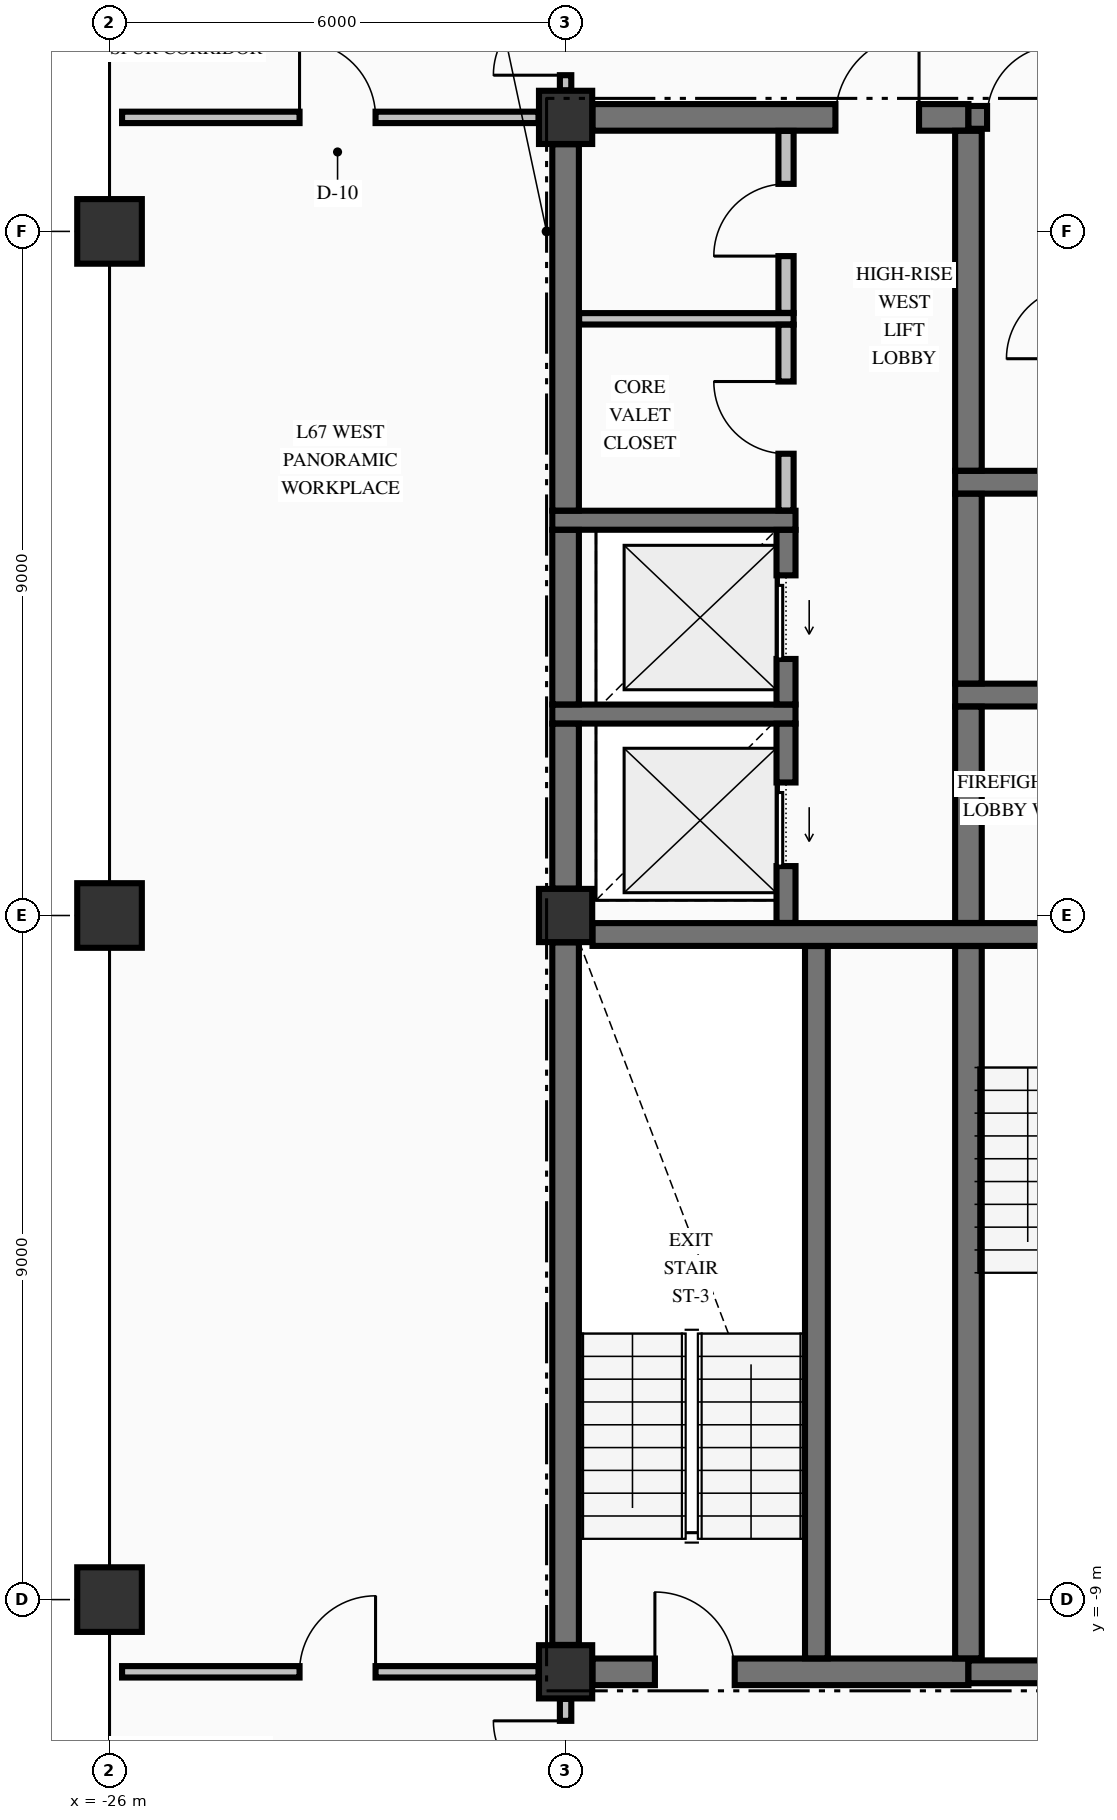
"""IFC4 building model, lengths in metres.
Left out: names, types, materials, properties, quantities, classifications, styles, units other than length and angle.
Written with IfcOpenShell. Run it as: python <this file> out.ifc"""

import sys

from ifc_helpers import new_model, si_unit, direction, frame, frame_2d, origin, origin_2d, place, context, subcontext, project, spatial, rectangle, extrude, element, fill, save


model = new_model("IFC4")
c1 = context("Model", 3, precision=1e-05, world=origin(), true_north=direction((0.0, 1.0)))
c2 = subcontext(c1, "Body", "Model", "MODEL_VIEW")
j1 = project(units=[si_unit("LENGTHUNIT", "METRE"), si_unit("PLANEANGLEUNIT", "RADIAN")], contexts=[c1])
p1 = place(None, origin())
s1 = spatial("IfcSite", under=j1, at=p1, CompositionType="ELEMENT")
p2 = place(p1, origin())
s2 = spatial("IfcBuilding", under=s1, at=p2, CompositionType="ELEMENT")
p3 = place(p2, frame((0.0, 0.0, 254.43)))
s3 = spatial("IfcBuildingStorey", under=s2, at=p3, CompositionType="ELEMENT", Elevation=254.43)
for number, where, z_axis, x_axis in (
    (1, (-26.0, -9.0, -0.425), (0.0, 0.0, 1.0), (1.0, 0.0, 0.0)),
    (2, (-26.0, 0.0, -0.425), (0.0, 0.0, 1.0), (1.0, 0.0, 0.0)),
    (3, (-26.0, 9.0, -0.425), (0.0, 0.0, 1.0), (1.0, 0.0, 0.0)),
):
    element("IfcColumn", number, at=place(p3, frame(where, z_axis=z_axis, x_axis=x_axis)), inside=s3, PredefinedType="COLUMN", context=c2, shape_type="SweptSolid", body=[
        extrude(rectangle(XDim=0.85, YDim=0.85, at=origin_2d()), origin(), (0.0, 0.0, 1.0), 3.405),
    ])
for number, where, z_axis, x_axis in (
    (4, (-20.0, -9.95, -0.425), (0.0, 0.0, 1.0), (1.0, 0.0, 0.0)),
    (5, (-20.0, 10.5, -0.425), (0.0, 0.0, 1.0), (1.0, 0.0, 0.0)),
    (6, (-20.0, 0.0, -0.425), (0.0, 0.0, 1.0), (1.0, 0.0, 0.0)),
):
    element("IfcColumn", number, at=place(p3, frame(where, z_axis=z_axis, x_axis=x_axis)), inside=s3, PredefinedType="COLUMN", context=c2, shape_type="SweptSolid", body=[
        extrude(rectangle(XDim=0.7, YDim=0.7, at=origin_2d()), origin(), (0.0, 0.0, 1.0), 3.405),
    ])
p4 = place(p3, frame((-19.646, -9.95, 0.0), z_axis=(0.0, 0.0, 1.0), x_axis=(1.0, 0.0, 0.0)))
e7 = element("IfcWall", 7, at=p4, inside=s3, PredefinedType="SHEAR", context=c2, shape_type="SweptSolid", body=[
    extrude(rectangle(XDim=4.946, YDim=0.35, at=frame_2d((2.473, 0.0))), origin(), (0.0, 0.0, 1.0), 2.98),
])
p5 = place(p4, frame((0.821, 0.0, 0.0)))
e8 = element("IfcOpeningElement", 8, at=p5, cuts=e7, PredefinedType="OPENING", context=c2, shape_type="SweptSolid", body=[
    extrude(rectangle(XDim=1.05, YDim=2.15, at=frame_2d((0.525, 1.075))), frame((0.0, 0.185, 0.0), z_axis=(0.0, -1.0, 0.0), x_axis=(1.0, 0.0, 0.0)), (0.0, 0.0, 1.0), 0.37),
])
p6 = place(p3, frame((-14.7, -9.95, 0.0), z_axis=(0.0, 0.0, 1.0), x_axis=(1.0, 0.0, 0.0)))
e9 = element("IfcWall", 9, at=p6, inside=s3, PredefinedType="SHEAR", context=c2, shape_type="SweptSolid", body=[
    extrude(rectangle(XDim=3.346, YDim=0.3, at=frame_2d((1.673, 0.0))), origin(), (0.0, 0.0, 1.0), 2.98),
])
p7 = place(p3, frame((-19.646, -0.25, 0.0), z_axis=(0.0, 0.0, 1.0), x_axis=(1.0, 0.0, 0.0)))
e10 = element("IfcWall", 10, at=p7, inside=s3, PredefinedType="SHEAR", context=c2, shape_type="SweptSolid", body=[
    extrude(rectangle(XDim=8.292, YDim=0.3, at=frame_2d((4.146, 0.0))), origin(), (0.0, 0.0, 1.0), 2.98),
])
p8 = place(p7, frame((5.946, 0.0, 0.0)))
e11 = element("IfcOpeningElement", 11, at=p8, cuts=e10, PredefinedType="OPENING", context=c2, shape_type="SweptSolid", body=[
    extrude(rectangle(XDim=1.1, YDim=2.15, at=frame_2d((0.55, 1.075))), frame((0.0, 0.16, 0.0), z_axis=(0.0, -1.0, 0.0), x_axis=(1.0, 0.0, 0.0)), (0.0, 0.0, 1.0), 0.32),
])
p9 = place(p3, frame((-20.175, 2.65, 0.0), z_axis=(0.0, 0.0, 1.0), x_axis=(1.0, 0.0, 0.0)))
e12 = element("IfcWall", 12, at=p9, inside=s3, PredefinedType="SOLIDWALL", context=c2, shape_type="SweptSolid", body=[
    extrude(rectangle(XDim=3.2, YDim=0.25, at=frame_2d((1.6, 0.0))), origin(), (0.0, 0.0, 1.0), 2.98),
])
p10 = place(p3, frame((-14.875, 2.9, 0.0), z_axis=(0.0, 0.0, 1.0), x_axis=(1.0, 0.0, 0.0)))
e13 = element("IfcWall", 13, at=p10, inside=s3, PredefinedType="SHEAR", context=c2, shape_type="SweptSolid", body=[
    extrude(rectangle(XDim=4.025, YDim=0.3, at=frame_2d((2.012, 0.0))), origin(), (0.0, 0.0, 1.0), 2.98),
])
p11 = place(p10, frame((2.075, 0.0, 0.0)))
e14 = element("IfcOpeningElement", 14, at=p11, cuts=e13, PredefinedType="OPENING", context=c2, shape_type="SweptSolid", body=[
    extrude(rectangle(XDim=1.1, YDim=2.2, at=frame_2d((0.55, 1.1))), frame((0.0, 0.16, 0.0), z_axis=(0.0, -1.0, 0.0), x_axis=(1.0, 0.0, 0.0)), (0.0, 0.0, 1.0), 0.32),
])
p12 = place(p3, frame((-20.175, 5.2, 0.0), z_axis=(0.0, 0.0, 1.0), x_axis=(1.0, 0.0, 0.0)))
e15 = element("IfcWall", 15, at=p12, inside=s3, PredefinedType="SOLIDWALL", context=c2, shape_type="SweptSolid", body=[
    extrude(rectangle(XDim=3.2, YDim=0.25, at=frame_2d((1.6, 0.0))), origin(), (0.0, 0.0, 1.0), 2.98),
])
p13 = place(p3, frame((-14.875, 5.7, 0.0), z_axis=(0.0, 0.0, 1.0), x_axis=(1.0, 0.0, 0.0)))
e16 = element("IfcWall", 16, at=p13, inside=s3, PredefinedType="SHEAR", context=c2, shape_type="SweptSolid", body=[
    extrude(rectangle(XDim=4.025, YDim=0.3, at=frame_2d((2.012, 0.0))), origin(), (0.0, 0.0, 1.0), 2.98),
])
p14 = place(p3, frame((-19.646, 10.5, 0.0), z_axis=(0.0, 0.0, 1.0), x_axis=(1.0, 0.0, 0.0)))
e17 = element("IfcWall", 17, at=p14, inside=s3, PredefinedType="SHEAR", context=c2, shape_type="SweptSolid", body=[
    extrude(rectangle(XDim=4.946, YDim=0.35, at=frame_2d((2.473, 0.0))), origin(), (0.0, 0.0, 1.0), 2.98),
])
p15 = place(p14, frame((3.196, 0.0, 0.0)))
e18 = element("IfcOpeningElement", 18, at=p15, cuts=e17, PredefinedType="OPENING", context=c2, shape_type="SweptSolid", body=[
    extrude(rectangle(XDim=1.1, YDim=2.15, at=frame_2d((0.55, 1.075))), frame((0.0, 0.185, 0.0), z_axis=(0.0, -1.0, 0.0), x_axis=(1.0, 0.0, 0.0)), (0.0, 0.0, 1.0), 0.37),
])
p16 = place(p3, frame((-14.7, 10.5, 0.0), z_axis=(0.0, 0.0, 1.0), x_axis=(1.0, 0.0, 0.0)))
e19 = element("IfcWall", 19, at=p16, inside=s3, PredefinedType="SHEAR", context=c2, shape_type="SweptSolid", body=[
    extrude(rectangle(XDim=3.346, YDim=0.3, at=frame_2d((1.673, 0.0))), origin(), (0.0, 0.0, 1.0), 2.98),
])
p17 = place(p16, frame((0.245, 0.0, 0.0)))
e20 = element("IfcOpeningElement", 20, at=p17, cuts=e19, PredefinedType="OPENING", context=c2, shape_type="SweptSolid", body=[
    extrude(rectangle(XDim=0.95, YDim=2.15, at=frame_2d((0.475, 1.075))), frame((0.0, 0.16, 0.0), z_axis=(0.0, -1.0, 0.0), x_axis=(1.0, 0.0, 0.0)), (0.0, 0.0, 1.0), 0.32),
])
p18 = place(p3, frame((-25.835, -9.95, 0.0), z_axis=(0.0, 0.0, 1.0), x_axis=(1.0, 0.0, 0.0)))
e21 = element("IfcWall", 21, at=p18, inside=s3, PredefinedType="PARTITIONING", context=c2, shape_type="SweptSolid", body=[
    extrude(rectangle(XDim=5.479, YDim=0.15, at=frame_2d((2.74, 0.0))), origin(), (0.0, 0.0, 1.0), 2.98),
])
p19 = place(p18, frame((2.335, 0.0, 0.0)))
e22 = element("IfcOpeningElement", 22, at=p19, cuts=e21, PredefinedType="OPENING", context=c2, shape_type="SweptSolid", body=[
    extrude(rectangle(XDim=1.0, YDim=2.15, at=frame_2d((0.5, 1.075))), frame((0.0, 0.085, 0.0), z_axis=(0.0, -1.0, 0.0), x_axis=(1.0, 0.0, 0.0)), (0.0, 0.0, 1.0), 0.17),
])
p20 = place(p3, frame((-19.822, 7.85, 0.0), z_axis=(0.0, 0.0, 1.0), x_axis=(1.0, 0.0, 0.0)))
e23 = element("IfcWall", 23, at=p20, inside=s3, PredefinedType="PARTITIONING", context=c2, shape_type="SweptSolid", body=[
    extrude(rectangle(XDim=2.822, YDim=0.15, at=frame_2d((1.411, 0.0))), origin(), (0.0, 0.0, 1.0), 2.98),
])
p21 = place(p3, frame((-25.835, 10.5, 0.0), z_axis=(0.0, 0.0, 1.0), x_axis=(1.0, 0.0, 0.0)))
e24 = element("IfcWall", 24, at=p21, inside=s3, PredefinedType="PARTITIONING", context=c2, shape_type="SweptSolid", body=[
    extrude(rectangle(XDim=5.479, YDim=0.15, at=frame_2d((2.74, 0.0))), origin(), (0.0, 0.0, 1.0), 2.98),
])
p22 = place(p21, frame((2.335, 0.0, 0.0)))
e25 = element("IfcOpeningElement", 25, at=p22, cuts=e24, PredefinedType="OPENING", context=c2, shape_type="SweptSolid", body=[
    extrude(rectangle(XDim=1.0, YDim=2.15, at=frame_2d((0.5, 1.075))), frame((0.0, 0.085, 0.0), z_axis=(0.0, -1.0, 0.0), x_axis=(1.0, 0.0, 0.0)), (0.0, 0.0, 1.0), 0.17),
])
p23 = place(p3, frame((-20.0, -9.596, 0.0), z_axis=(0.0, 0.0, 1.0), x_axis=(0.0, 1.0, 0.0)))
e26 = element("IfcWall", 26, at=p23, inside=s3, PredefinedType="SHEAR", context=c2, shape_type="SweptSolid", body=[
    extrude(rectangle(XDim=9.242, YDim=0.35, at=frame_2d((4.621, 0.0))), origin(), (0.0, 0.0, 1.0), 2.98),
])
p24 = place(p3, frame((-20.0, 0.354, 0.0), z_axis=(0.0, 0.0, 1.0), x_axis=(0.0, 1.0, 0.0)))
e27 = element("IfcWall", 27, at=p24, inside=s3, PredefinedType="SHEAR", context=c2, shape_type="SweptSolid", body=[
    extrude(rectangle(XDim=2.169, YDim=0.35, at=frame_2d((1.084, 0.0))), origin(), (0.0, 0.0, 1.0), 2.98),
])
p25 = place(p3, frame((-20.0, 2.777, 0.0), z_axis=(0.0, 0.0, 1.0), x_axis=(0.0, 1.0, 0.0)))
e28 = element("IfcWall", 28, at=p25, inside=s3, PredefinedType="SHEAR", context=c2, shape_type="SweptSolid", body=[
    extrude(rectangle(XDim=2.296, YDim=0.35, at=frame_2d((1.148, 0.0))), origin(), (0.0, 0.0, 1.0), 2.98),
])
p26 = place(p3, frame((-20.0, 5.327, 0.0), z_axis=(0.0, 0.0, 1.0), x_axis=(0.0, 1.0, 0.0)))
e29 = element("IfcWall", 29, at=p26, inside=s3, PredefinedType="SHEAR", context=c2, shape_type="SweptSolid", body=[
    extrude(rectangle(XDim=4.819, YDim=0.35, at=frame_2d((2.41, 0.0))), origin(), (0.0, 0.0, 1.0), 2.98),
])
p27 = place(p3, frame((-17.1, -0.098, 0.0), z_axis=(0.0, 0.0, 1.0), x_axis=(0.0, 1.0, 0.0)))
e30 = element("IfcWall", 30, at=p27, inside=s3, PredefinedType="SOLIDWALL", context=c2, shape_type="SweptSolid", body=[
    extrude(rectangle(XDim=2.621, YDim=0.25, at=frame_2d((1.311, 0.0))), origin(), (0.0, 0.0, 1.0), 2.98),
])
p28 = place(p27, frame((0.748, 0.0, 0.0)))
e31 = element("IfcOpeningElement", 31, at=p28, cuts=e30, PredefinedType="OPENING", context=c2, shape_type="SweptSolid", body=[
    extrude(rectangle(XDim=1.1, YDim=2.2, at=frame_2d((0.55, 1.1))), frame((0.0, 0.135, 0.0), z_axis=(0.0, -1.0, 0.0), x_axis=(1.0, 0.0, 0.0)), (0.0, 0.0, 1.0), 0.27),
])
p29 = place(p3, frame((-17.1, 2.777, 0.0), z_axis=(0.0, 0.0, 1.0), x_axis=(0.0, 1.0, 0.0)))
e32 = element("IfcWall", 32, at=p29, inside=s3, PredefinedType="SOLIDWALL", context=c2, shape_type="SweptSolid", body=[
    extrude(rectangle(XDim=2.296, YDim=0.25, at=frame_2d((1.148, 0.0))), origin(), (0.0, 0.0, 1.0), 2.98),
])
p30 = place(p29, frame((0.598, 0.0, 0.0)))
e33 = element("IfcOpeningElement", 33, at=p30, cuts=e32, PredefinedType="OPENING", context=c2, shape_type="SweptSolid", body=[
    extrude(rectangle(XDim=1.1, YDim=2.2, at=frame_2d((0.55, 1.1))), frame((0.0, 0.135, 0.0), z_axis=(0.0, -1.0, 0.0), x_axis=(1.0, 0.0, 0.0)), (0.0, 0.0, 1.0), 0.27),
])
p31 = place(p3, frame((-16.7, -9.773, 0.0), z_axis=(0.0, 0.0, 1.0), x_axis=(0.0, 1.0, 0.0)))
e34 = element("IfcWall", 34, at=p31, inside=s3, PredefinedType="SHEAR", context=c2, shape_type="SweptSolid", body=[
    extrude(rectangle(XDim=9.371, YDim=0.3, at=frame_2d((4.686, 0.0))), origin(), (0.0, 0.0, 1.0), 2.98),
])
p32 = place(p3, frame((-14.7, -9.773, 0.0), z_axis=(0.0, 0.0, 1.0), x_axis=(0.0, 1.0, 0.0)))
e35 = element("IfcWall", 35, at=p32, inside=s3, PredefinedType="SHEAR", context=c2, shape_type="SweptSolid", body=[
    extrude(rectangle(XDim=9.371, YDim=0.35, at=frame_2d((4.686, 0.0))), origin(), (0.0, 0.0, 1.0), 2.98),
])
p33 = place(p3, frame((-14.7, -0.098, 0.0), z_axis=(0.0, 0.0, 1.0), x_axis=(0.0, 1.0, 0.0)))
e36 = element("IfcWall", 36, at=p33, inside=s3, PredefinedType="SHEAR", context=c2, shape_type="SweptSolid", body=[
    extrude(rectangle(XDim=2.846, YDim=0.35, at=frame_2d((1.423, 0.0))), origin(), (0.0, 0.0, 1.0), 2.98),
])
p34 = place(p3, frame((-14.7, 3.052, 0.0), z_axis=(0.0, 0.0, 1.0), x_axis=(0.0, 1.0, 0.0)))
e37 = element("IfcWall", 37, at=p34, inside=s3, PredefinedType="SHEAR", context=c2, shape_type="SweptSolid", body=[
    extrude(rectangle(XDim=2.496, YDim=0.35, at=frame_2d((1.248, 0.0))), origin(), (0.0, 0.0, 1.0), 2.98),
])
p35 = place(p3, frame((-14.7, 5.852, 0.0), z_axis=(0.0, 0.0, 1.0), x_axis=(0.0, 1.0, 0.0)))
e38 = element("IfcWall", 38, at=p35, inside=s3, PredefinedType="SHEAR", context=c2, shape_type="SweptSolid", body=[
    extrude(rectangle(XDim=4.471, YDim=0.35, at=frame_2d((2.235, 0.0))), origin(), (0.0, 0.0, 1.0), 2.98),
])
p36 = place(p3, frame((-20.0, -12.122, 0.0), z_axis=(0.0, 0.0, 1.0), x_axis=(0.0, 1.0, 0.0)))
e39 = element("IfcWall", 39, at=p36, inside=s3, PredefinedType="PARTITIONING", context=c2, shape_type="SweptSolid", body=[
    extrude(rectangle(XDim=1.816, YDim=0.15, at=frame_2d((0.908, 0.0))), origin(), (0.0, 0.0, 1.0), 2.98),
])
p37 = place(p36, frame((0.577, 0.0, 0.0)))
e40 = element("IfcOpeningElement", 40, at=p37, cuts=e39, PredefinedType="OPENING", context=c2, shape_type="SweptSolid", body=[
    extrude(rectangle(XDim=0.95, YDim=2.15, at=frame_2d((0.475, 1.075))), frame((0.0, 0.085, 0.0), z_axis=(0.0, -1.0, 0.0), x_axis=(1.0, 0.0, 0.0)), (0.0, 0.0, 1.0), 0.17),
])
p38 = place(p3, frame((-20.0, 10.856, 0.0), z_axis=(0.0, 0.0, 1.0), x_axis=(0.0, 1.0, 0.0)))
e41 = element("IfcWall", 41, at=p38, inside=s3, PredefinedType="PARTITIONING", context=c2, shape_type="SweptSolid", body=[
    extrude(rectangle(XDim=1.616, YDim=0.15, at=frame_2d((0.808, 0.0))), origin(), (0.0, 0.0, 1.0), 2.98),
])
p39 = place(p38, frame((0.199, 0.0, 0.0)))
e42 = element("IfcOpeningElement", 42, at=p39, cuts=e41, PredefinedType="OPENING", context=c2, shape_type="SweptSolid", body=[
    extrude(rectangle(XDim=0.95, YDim=2.15, at=frame_2d((0.475, 1.075))), frame((0.0, 0.085, 0.0), z_axis=(0.0, -1.0, 0.0), x_axis=(1.0, 0.0, 0.0)), (0.0, 0.0, 1.0), 0.17),
])
p40 = place(p3, frame((-17.1, 5.328, 0.0), z_axis=(0.0, 0.0, 1.0), x_axis=(0.0, 1.0, 0.0)))
e43 = element("IfcWall", 43, at=p40, inside=s3, PredefinedType="PARTITIONING", context=c2, shape_type="SweptSolid", body=[
    extrude(rectangle(XDim=2.444, YDim=0.2, at=frame_2d((1.222, 0.0))), origin(), (0.0, 0.0, 1.0), 2.98),
])
p41 = place(p40, frame((0.747, 0.0, 0.0)))
e44 = element("IfcOpeningElement", 44, at=p41, cuts=e43, PredefinedType="OPENING", context=c2, shape_type="SweptSolid", body=[
    extrude(rectangle(XDim=0.95, YDim=2.15, at=frame_2d((0.475, 1.075))), frame((0.0, 0.11, 0.0), z_axis=(0.0, -1.0, 0.0), x_axis=(1.0, 0.0, 0.0)), (0.0, 0.0, 1.0), 0.22),
])
p42 = place(p3, frame((-17.1, 7.928, 0.0), z_axis=(0.0, 0.0, 1.0), x_axis=(0.0, 1.0, 0.0)))
e45 = element("IfcWall", 45, at=p42, inside=s3, PredefinedType="PARTITIONING", context=c2, shape_type="SweptSolid", body=[
    extrude(rectangle(XDim=2.394, YDim=0.2, at=frame_2d((1.197, 0.0))), origin(), (0.0, 0.0, 1.0), 2.98),
])
p43 = place(p42, frame((0.747, 0.0, 0.0)))
e46 = element("IfcOpeningElement", 46, at=p43, cuts=e45, PredefinedType="OPENING", context=c2, shape_type="SweptSolid", body=[
    extrude(rectangle(XDim=0.95, YDim=2.15, at=frame_2d((0.475, 1.075))), frame((0.0, 0.11, 0.0), z_axis=(0.0, -1.0, 0.0), x_axis=(1.0, 0.0, 0.0)), (0.0, 0.0, 1.0), 0.22),
])
p44 = place(p17, origin())
e47 = element("IfcDoor", 47, at=p44, inside=s3, OperationType="SINGLE_SWING_RIGHT", PredefinedType="DOOR", context=c2, shape_type="SweptSolid", body=[
    extrude(rectangle(XDim=0.95, YDim=2.15, at=frame_2d((0.475, 1.075))), frame((0.0, 0.025, 0.0), z_axis=(0.0, -1.0, 0.0), x_axis=(1.0, 0.0, 0.0)), (0.0, 0.0, 1.0), 0.05),
])
fill(e20, e47)
p45 = place(p5, origin())
e48 = element("IfcDoor", 48, at=p45, inside=s3, OperationType="SINGLE_SWING_LEFT", PredefinedType="DOOR", context=c2, shape_type="SweptSolid", body=[
    extrude(rectangle(XDim=1.05, YDim=2.15, at=frame_2d((0.525, 1.075))), frame((0.0, 0.025, 0.0), z_axis=(0.0, -1.0, 0.0), x_axis=(1.0, 0.0, 0.0)), (0.0, 0.0, 1.0), 0.05),
])
fill(e8, e48)
p46 = place(p28, origin())
e49 = element("IfcDoor", 49, at=p46, inside=s3, OperationType="SLIDING_TO_LEFT", PredefinedType="DOOR", context=c2, shape_type="SweptSolid", body=[
    extrude(rectangle(XDim=1.1, YDim=2.2, at=frame_2d((0.55, 1.1))), frame((0.0, 0.025, 0.0), z_axis=(0.0, -1.0, 0.0), x_axis=(1.0, 0.0, 0.0)), (0.0, 0.0, 1.0), 0.05),
])
fill(e31, e49)
p47 = place(p30, origin())
e50 = element("IfcDoor", 50, at=p47, inside=s3, OperationType="SLIDING_TO_LEFT", PredefinedType="DOOR", context=c2, shape_type="SweptSolid", body=[
    extrude(rectangle(XDim=1.1, YDim=2.2, at=frame_2d((0.55, 1.1))), frame((0.0, 0.025, 0.0), z_axis=(0.0, -1.0, 0.0), x_axis=(1.0, 0.0, 0.0)), (0.0, 0.0, 1.0), 0.05),
])
fill(e33, e50)
p48 = place(p15, origin())
e51 = element("IfcDoor", 51, at=p48, inside=s3, OperationType="SINGLE_SWING_RIGHT", PredefinedType="DOOR", context=c2, shape_type="SweptSolid", body=[
    extrude(rectangle(XDim=1.1, YDim=2.15, at=frame_2d((0.55, 1.075))), frame((0.0, 0.025, 0.0), z_axis=(0.0, -1.0, 0.0), x_axis=(1.0, 0.0, 0.0)), (0.0, 0.0, 1.0), 0.05),
])
fill(e18, e51)
p49 = place(p43, origin())
e52 = element("IfcDoor", 52, at=p49, inside=s3, OperationType="SINGLE_SWING_LEFT", PredefinedType="DOOR", context=c2, shape_type="SweptSolid", body=[
    extrude(rectangle(XDim=0.95, YDim=2.15, at=frame_2d((0.475, 1.075))), frame((0.0, 0.025, 0.0), z_axis=(0.0, -1.0, 0.0), x_axis=(1.0, 0.0, 0.0)), (0.0, 0.0, 1.0), 0.05),
])
fill(e46, e52)
p50 = place(p41, origin())
e53 = element("IfcDoor", 53, at=p50, inside=s3, OperationType="SINGLE_SWING_RIGHT", PredefinedType="DOOR", context=c2, shape_type="SweptSolid", body=[
    extrude(rectangle(XDim=0.95, YDim=2.15, at=frame_2d((0.475, 1.075))), frame((0.0, 0.025, 0.0), z_axis=(0.0, -1.0, 0.0), x_axis=(1.0, 0.0, 0.0)), (0.0, 0.0, 1.0), 0.05),
])
fill(e44, e53)
p51 = place(p39, origin())
e54 = element("IfcDoor", 54, at=p51, inside=s3, OperationType="SINGLE_SWING_LEFT", PredefinedType="DOOR", context=c2, shape_type="SweptSolid", body=[
    extrude(rectangle(XDim=0.95, YDim=2.15, at=frame_2d((0.475, 1.075))), frame((0.0, 0.025, 0.0), z_axis=(0.0, -1.0, 0.0), x_axis=(1.0, 0.0, 0.0)), (0.0, 0.0, 1.0), 0.05),
])
fill(e42, e54)
p52 = place(p37, origin())
e55 = element("IfcDoor", 55, at=p52, inside=s3, OperationType="SINGLE_SWING_RIGHT", PredefinedType="DOOR", context=c2, shape_type="SweptSolid", body=[
    extrude(rectangle(XDim=0.95, YDim=2.15, at=frame_2d((0.475, 1.075))), frame((0.0, 0.025, 0.0), z_axis=(0.0, -1.0, 0.0), x_axis=(1.0, 0.0, 0.0)), (0.0, 0.0, 1.0), 0.05),
])
fill(e40, e55)
p53 = place(p22, origin())
e56 = element("IfcDoor", 56, at=p53, inside=s3, OperationType="SINGLE_SWING_LEFT", PredefinedType="DOOR", context=c2, shape_type="SweptSolid", body=[
    extrude(rectangle(XDim=1.0, YDim=2.15, at=frame_2d((0.5, 1.075))), frame((0.0, 0.025, 0.0), z_axis=(0.0, -1.0, 0.0), x_axis=(1.0, 0.0, 0.0)), (0.0, 0.0, 1.0), 0.05),
])
fill(e25, e56)
p54 = place(p19, origin())
e57 = element("IfcDoor", 57, at=p54, inside=s3, OperationType="SINGLE_SWING_RIGHT", PredefinedType="DOOR", context=c2, shape_type="SweptSolid", body=[
    extrude(rectangle(XDim=1.0, YDim=2.15, at=frame_2d((0.5, 1.075))), frame((0.0, 0.025, 0.0), z_axis=(0.0, -1.0, 0.0), x_axis=(1.0, 0.0, 0.0)), (0.0, 0.0, 1.0), 0.05),
])
fill(e22, e57)
save(model, sys.argv[1])
